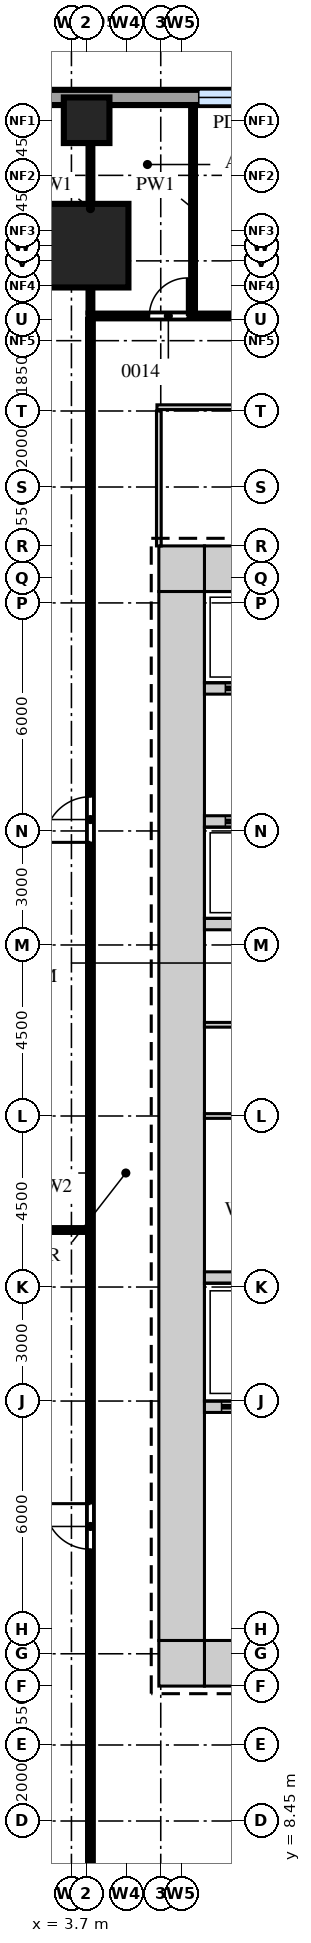
"""IFC4 building model, lengths in metres.
Left out: names, types, materials, properties, quantities, classifications, styles, units other than length and angle.
Written with IfcOpenShell. Run it as: python <this file> out.ifc"""

import sys

from ifc_helpers import new_model, si_unit, direction, frame, frame_2d, origin, origin_2d, place, context, subcontext, project, spatial, rectangle, extrude, source, transform, mapped, element, fill, save


model = new_model("IFC4")
c1 = context("Model", 3, precision=1e-05, world=origin(), true_north=direction((0.0, 1.0)))
c2 = subcontext(c1, "Body", "Model", "MODEL_VIEW")
j1 = project(units=[si_unit("LENGTHUNIT", "METRE"), si_unit("PLANEANGLEUNIT", "RADIAN")], contexts=[c1])
p1 = place(None, origin())
s1 = spatial("IfcSite", under=j1, at=p1, CompositionType="ELEMENT")
p2 = place(p1, origin())
s2 = spatial("IfcBuilding", under=s1, at=p2, CompositionType="ELEMENT")
p3 = place(p2, frame((0.0, 0.0, 18.5)))
s3 = spatial("IfcBuildingStorey", under=s2, at=p3, CompositionType="ELEMENT", Elevation=18.5)
m1 = source(origin(), c2, "Body", "SweptSolid", [
    extrude(rectangle(XDim=6.7, YDim=1.2, at=frame_2d((3.35, 0.0))), origin(), (0.0, 0.0, 1.0), 4.7),
])
p4 = place(p3, frame((7.2, 41.4, 0.0), z_axis=(0.0, 0.0, 1.0), x_axis=(1.0, 0.0, 0.0)))
e1 = element("IfcWall", 1, at=p4, inside=s3, PredefinedType="SHEAR", context=c2, shape_type="MappedRepresentation", body=[
    mapped(m1, transform((0.0, 0.0, 0.0))),
])
m2 = source(origin(), c2, "Body", "SweptSolid", [
    extrude(rectangle(XDim=1.2, YDim=1.2, at=frame_2d((0.6, 0.0))), origin(), (0.0, 0.0, 1.0), 4.7),
])
p5 = place(p3, frame((6.0, 41.4, 0.0), z_axis=(0.0, 0.0, 1.0), x_axis=(1.0, 0.0, 0.0)))
e2 = element("IfcWall", 2, at=p5, inside=s3, PredefinedType="SHEAR", context=c2, shape_type="MappedRepresentation", body=[
    mapped(m2, transform((0.0, 0.0, 0.0))),
])
p6 = place(p3, frame((7.2, 12.6, 0.0), z_axis=(0.0, 0.0, 1.0), x_axis=(1.0, 0.0, 0.0)))
e3 = element("IfcWall", 3, at=p6, inside=s3, PredefinedType="SHEAR", context=c2, shape_type="MappedRepresentation", body=[
    mapped(m1, transform((0.0, 0.0, 0.0))),
])
m3 = source(origin(), c2, "Body", "SweptSolid", [
    extrude(rectangle(XDim=1.2, YDim=2.1, at=frame_2d((0.6, 1.05))), frame((0.0, 0.61, 0.0), z_axis=(0.0, -1.0, 0.0), x_axis=(1.0, 0.0, 0.0)), (0.0, 0.0, 1.0), 1.22),
])
p7 = place(p6, frame((5.0, 0.0, 0.0)))
e4 = element("IfcOpeningElement", 4, at=p7, cuts=e3, PredefinedType="OPENING", context=c2, shape_type="MappedRepresentation", body=[
    mapped(m3, transform((0.0, 0.0, 0.0))),
])
p8 = place(p6, frame((1.65, 0.0, 0.0)))
e5 = element("IfcOpeningElement", 5, at=p8, cuts=e3, PredefinedType="OPENING", context=c2, shape_type="MappedRepresentation", body=[
    mapped(m3, transform((0.0, 0.0, 0.0))),
])
p9 = place(p3, frame((6.0, 12.6, 0.0), z_axis=(0.0, 0.0, 1.0), x_axis=(1.0, 0.0, 0.0)))
e6 = element("IfcWall", 6, at=p9, inside=s3, PredefinedType="SHEAR", context=c2, shape_type="MappedRepresentation", body=[
    mapped(m2, transform((0.0, 0.0, 0.0))),
])
m4 = source(origin(), c2, "Body", "SweptSolid", [
    extrude(rectangle(XDim=27.6, YDim=1.2, at=frame_2d((13.8, 0.0))), origin(), (0.0, 0.0, 1.0), 4.7),
])
p10 = place(p3, frame((6.6, 13.2, 0.0), z_axis=(0.0, 0.0, 1.0), x_axis=(0.0, 1.0, 0.0)))
e7 = element("IfcWall", 7, at=p10, inside=s3, PredefinedType="SHEAR", context=c2, shape_type="MappedRepresentation", body=[
    mapped(m4, transform((0.0, 0.0, 0.0))),
])
m5 = source(origin(), c2, "Body", "SweptSolid", [
    extrude(rectangle(XDim=13.0, YDim=0.3, at=frame_2d((6.5, 0.0))), origin(), (0.0, 0.0, 1.0), 4.7),
])
p11 = place(p3, frame((7.2, 22.75, 0.0), z_axis=(0.0, 0.0, 1.0), x_axis=(1.0, 0.0, 0.0)))
e8 = element("IfcWall", 8, at=p11, inside=s3, PredefinedType="STANDARD", context=c2, shape_type="MappedRepresentation", body=[
    mapped(m5, transform((0.0, 0.0, 0.0))),
])
m6 = source(origin(), c2, "Body", "SweptSolid", [
    extrude(rectangle(XDim=8.875, YDim=0.3, at=frame_2d((4.438, 0.0))), origin(), (0.0, 0.0, 1.0), 4.7),
])
p12 = place(p3, frame((7.2, 19.35, 0.0), z_axis=(0.0, 0.0, 1.0), x_axis=(1.0, 0.0, 0.0)))
e9 = element("IfcWall", 9, at=p12, inside=s3, PredefinedType="STANDARD", context=c2, shape_type="MappedRepresentation", body=[
    mapped(m6, transform((0.0, 0.0, 0.0))),
])
m7 = source(origin(), c2, "Body", "SweptSolid", [
    extrude(rectangle(XDim=1.2, YDim=2.1, at=frame_2d((0.6, 1.05))), frame((0.0, 0.16, 0.0), z_axis=(0.0, -1.0, 0.0), x_axis=(1.0, 0.0, 0.0)), (0.0, 0.0, 1.0), 0.32),
])
p13 = place(p12, frame((0.45, 0.0, 0.0)))
e10 = element("IfcOpeningElement", 10, at=p13, cuts=e9, PredefinedType="OPENING", context=c2, shape_type="MappedRepresentation", body=[
    mapped(m7, transform((0.0, 0.0, 0.0))),
])
p14 = place(p12, frame((2.8, 0.0, 0.0)))
e11 = element("IfcOpeningElement", 11, at=p14, cuts=e9, PredefinedType="OPENING", context=c2, shape_type="MappedRepresentation", body=[
    mapped(m7, transform((0.0, 0.0, 0.0))),
])
p15 = place(p12, frame((5.05, 0.0, 0.0)))
e12 = element("IfcOpeningElement", 12, at=p15, cuts=e9, PredefinedType="OPENING", context=c2, shape_type="MappedRepresentation", body=[
    mapped(m7, transform((0.0, 0.0, 0.0))),
])
p16 = place(p12, frame((7.2, 0.0, 0.0)))
e13 = element("IfcOpeningElement", 13, at=p16, cuts=e9, PredefinedType="OPENING", context=c2, shape_type="MappedRepresentation", body=[
    mapped(m7, transform((0.0, 0.0, 0.0))),
])
m8 = source(origin(), c2, "Body", "SweptSolid", [
    extrude(rectangle(XDim=15.6, YDim=0.3, at=frame_2d((7.8, 0.0))), origin(), (0.0, 0.0, 1.0), 4.7),
])
p17 = place(p3, frame((7.2, 32.05, 0.0), z_axis=(0.0, 0.0, 1.0), x_axis=(1.0, 0.0, 0.0)))
e14 = element("IfcWall", 14, at=p17, inside=s3, PredefinedType="STANDARD", context=c2, shape_type="MappedRepresentation", body=[
    mapped(m8, transform((0.0, 0.0, 0.0))),
])
p18 = place(p3, frame((7.2, 38.25, 0.0), z_axis=(0.0, 0.0, 1.0), x_axis=(1.0, 0.0, 0.0)))
e15 = element("IfcWall", 15, at=p18, inside=s3, PredefinedType="STANDARD", context=c2, shape_type="MappedRepresentation", body=[
    mapped(m8, transform((0.0, 0.0, 0.0))),
])
p19 = place(p18, frame((0.55, 0.0, 0.0)))
e16 = element("IfcOpeningElement", 16, at=p19, cuts=e15, PredefinedType="OPENING", context=c2, shape_type="MappedRepresentation", body=[
    mapped(m7, transform((0.0, 0.0, 0.0))),
])
p20 = place(p18, frame((3.1, 0.0, 0.0)))
e17 = element("IfcOpeningElement", 17, at=p20, cuts=e15, PredefinedType="OPENING", context=c2, shape_type="MappedRepresentation", body=[
    mapped(m7, transform((0.0, 0.0, 0.0))),
])
p21 = place(p18, frame((5.65, 0.0, 0.0)))
e18 = element("IfcOpeningElement", 18, at=p21, cuts=e15, PredefinedType="OPENING", context=c2, shape_type="MappedRepresentation", body=[
    mapped(m7, transform((0.0, 0.0, 0.0))),
])
p22 = place(p18, frame((8.2, 0.0, 0.0)))
e19 = element("IfcOpeningElement", 19, at=p22, cuts=e15, PredefinedType="OPENING", context=c2, shape_type="MappedRepresentation", body=[
    mapped(m7, transform((0.0, 0.0, 0.0))),
])
p23 = place(p3, frame((7.2, 34.75, 0.0), z_axis=(0.0, 0.0, 1.0), x_axis=(1.0, 0.0, 0.0)))
e20 = element("IfcWall", 20, at=p23, inside=s3, PredefinedType="STANDARD", context=c2, shape_type="MappedRepresentation", body=[
    mapped(m8, transform((0.0, 0.0, 0.0))),
])
p24 = place(p23, frame((0.55, 0.0, 0.0)))
e21 = element("IfcOpeningElement", 21, at=p24, cuts=e20, PredefinedType="OPENING", context=c2, shape_type="MappedRepresentation", body=[
    mapped(m7, transform((0.0, 0.0, 0.0))),
])
p25 = place(p23, frame((3.1, 0.0, 0.0)))
e22 = element("IfcOpeningElement", 22, at=p25, cuts=e20, PredefinedType="OPENING", context=c2, shape_type="MappedRepresentation", body=[
    mapped(m7, transform((0.0, 0.0, 0.0))),
])
p26 = place(p23, frame((5.65, 0.0, 0.0)))
e23 = element("IfcOpeningElement", 23, at=p26, cuts=e20, PredefinedType="OPENING", context=c2, shape_type="MappedRepresentation", body=[
    mapped(m7, transform((0.0, 0.0, 0.0))),
])
p27 = place(p23, frame((8.2, 0.0, 0.0)))
e24 = element("IfcOpeningElement", 24, at=p27, cuts=e20, PredefinedType="OPENING", context=c2, shape_type="MappedRepresentation", body=[
    mapped(m7, transform((0.0, 0.0, 0.0))),
])
m9 = source(origin(), c2, "Body", "SweptSolid", [
    extrude(rectangle(XDim=2.2, YDim=2.2, at=origin_2d()), origin(), (0.0, 0.0, 1.0), 4.7),
])
p28 = place(p3, frame((4.1, 49.9, 0.0), z_axis=(0.0, 0.0, 1.0), x_axis=(1.0, 0.0, 0.0)))
e25 = element("IfcColumn", 25, at=p28, inside=s3, PredefinedType="COLUMN", context=c2, shape_type="MappedRepresentation", body=[
    mapped(m9, transform((0.0, 0.0, 0.0))),
])
m10 = source(origin(), c2, "Body", "SweptSolid", [
    extrude(rectangle(XDim=1.2, YDim=1.2, at=origin_2d()), origin(), (0.0, 0.0, 1.0), 4.7),
])
p29 = place(p3, frame((4.1, 53.2, 0.0), z_axis=(0.0, 0.0, 1.0), x_axis=(1.0, 0.0, 0.0)))
e26 = element("IfcColumn", 26, at=p29, inside=s3, PredefinedType="COLUMN", context=c2, shape_type="MappedRepresentation", body=[
    mapped(m10, transform((0.0, 0.0, 0.0))),
])
m11 = source(origin(), c2, "Body", "SweptSolid", [
    extrude(rectangle(XDim=32.04, YDim=0.4, at=frame_2d((16.02, 0.0))), origin(), (0.0, 0.0, 1.0), 4.7),
])
p30 = place(p3, frame((30.25, 53.8, 0.0), z_axis=(0.0, 0.0, 1.0), x_axis=(-1.0, 0.0, 0.0)))
e27 = element("IfcWall", 27, at=p30, inside=s3, PredefinedType="SOLIDWALL", context=c2, shape_type="MappedRepresentation", body=[
    mapped(m11, transform((0.0, 0.0, 0.0))),
])
m12 = source(origin(), c2, "Body", "SweptSolid", [
    extrude(rectangle(XDim=2.4, YDim=2.4, at=frame_2d((1.2, 1.2))), frame((0.0, 0.21, 0.0), z_axis=(0.0, -1.0, 0.0), x_axis=(1.0, 0.0, 0.0)), (0.0, 0.0, 1.0), 0.42),
])
p31 = place(p30, frame((14.8, 0.0, 1.0)))
e28 = element("IfcOpeningElement", 28, at=p31, cuts=e27, PredefinedType="OPENING", context=c2, shape_type="MappedRepresentation", body=[
    mapped(m12, transform((0.0, 0.0, 0.0))),
])
p32 = place(p30, frame((20.8, 0.0, 1.0)))
e29 = element("IfcOpeningElement", 29, at=p32, cuts=e27, PredefinedType="OPENING", context=c2, shape_type="MappedRepresentation", body=[
    mapped(m12, transform((0.0, 0.0, 0.0))),
])
m13 = source(origin(), c2, "Body", "SweptSolid", [
    extrude(rectangle(XDim=41.8, YDim=0.125, at=frame_2d((20.9, 0.0))), origin(), (0.0, 0.0, 1.0), 4.7),
])
p33 = place(p3, frame((4.2, 6.15, 0.0), z_axis=(0.0, 0.0, 1.0), x_axis=(0.0, 1.0, 0.0)))
e30 = element("IfcWall", 30, at=p33, inside=s3, PredefinedType="PARTITIONING", context=c2, shape_type="MappedRepresentation", body=[
    mapped(m13, transform((0.0, 0.0, 0.0))),
])
m14 = source(origin(), c2, "Body", "SweptSolid", [
    extrude(rectangle(XDim=1.2, YDim=2.1, at=frame_2d((0.6, 1.05))), frame((0.0, 0.073, 0.0), z_axis=(0.0, -1.0, 0.0), x_axis=(1.0, 0.0, 0.0)), (0.0, 0.0, 1.0), 0.145),
])
p34 = place(p33, frame((9.45, 0.0, 0.0)))
e31 = element("IfcOpeningElement", 31, at=p34, cuts=e30, PredefinedType="OPENING", context=c2, shape_type="MappedRepresentation", body=[
    mapped(m14, transform((0.0, 0.0, 0.0))),
])
p35 = place(p33, frame((28.05, 0.0, 0.0)))
e32 = element("IfcOpeningElement", 32, at=p35, cuts=e30, PredefinedType="OPENING", context=c2, shape_type="MappedRepresentation", body=[
    mapped(m14, transform((0.0, 0.0, 0.0))),
])
m15 = source(origin(), c2, "Body", "SweptSolid", [
    extrude(rectangle(XDim=12.7, YDim=0.1, at=frame_2d((6.35, 0.0))), origin(), (0.0, 0.0, 1.0), 4.7),
])
p36 = place(p3, frame((-8.6, 24.0, 0.0), z_axis=(0.0, 0.0, 1.0), x_axis=(1.0, 0.0, 0.0)))
e33 = element("IfcWall", 33, at=p36, inside=s3, PredefinedType="PARTITIONING", context=c2, shape_type="MappedRepresentation", body=[
    mapped(m15, transform((0.0, 0.0, 0.0))),
])
m16 = source(origin(), c2, "Body", "SweptSolid", [
    extrude(rectangle(XDim=15.6, YDim=0.125, at=frame_2d((7.8, 0.0))), origin(), (0.0, 0.0, 1.0), 4.7),
])
p37 = place(p3, frame((7.2, 27.0, 0.0), z_axis=(0.0, 0.0, 1.0), x_axis=(1.0, 0.0, 0.0)))
e34 = element("IfcWall", 34, at=p37, inside=s3, PredefinedType="PARTITIONING", context=c2, shape_type="MappedRepresentation", body=[
    mapped(m16, transform((0.0, 0.0, 0.0))),
])
m17 = source(origin(), c2, "Body", "SweptSolid", [
    extrude(rectangle(XDim=0.9, YDim=2.1, at=frame_2d((0.45, 1.05))), frame((0.0, 0.073, 0.0), z_axis=(0.0, -1.0, 0.0), x_axis=(1.0, 0.0, 0.0)), (0.0, 0.0, 1.0), 0.145),
])
p38 = place(p37, frame((2.45, 0.0, 0.0)))
e35 = element("IfcOpeningElement", 35, at=p38, cuts=e34, PredefinedType="OPENING", context=c2, shape_type="MappedRepresentation", body=[
    mapped(m17, transform((0.0, 0.0, 0.0))),
])
p39 = place(p37, frame((8.25, 0.0, 0.0)))
e36 = element("IfcOpeningElement", 36, at=p39, cuts=e34, PredefinedType="OPENING", context=c2, shape_type="MappedRepresentation", body=[
    mapped(m17, transform((0.0, 0.0, 0.0))),
])
m18 = source(origin(), c2, "Body", "SweptSolid", [
    extrude(rectangle(XDim=1.0, YDim=2.1, at=frame_2d((0.5, 1.05))), frame((0.0, 0.073, 0.0), z_axis=(0.0, -1.0, 0.0), x_axis=(1.0, 0.0, 0.0)), (0.0, 0.0, 1.0), 0.145),
])
p40 = place(p37, frame((13.1, 0.0, 0.0)))
e37 = element("IfcOpeningElement", 37, at=p40, cuts=e34, PredefinedType="OPENING", context=c2, shape_type="MappedRepresentation", body=[
    mapped(m18, transform((0.0, 0.0, 0.0))),
])
m19 = source(origin(), c2, "Body", "SweptSolid", [
    extrude(rectangle(XDim=3.95, YDim=0.125, at=frame_2d((1.975, 0.0))), origin(), (0.0, 0.0, 1.0), 4.7),
])
p41 = place(p3, frame((7.2, 29.4, 0.0), z_axis=(0.0, 0.0, 1.0), x_axis=(1.0, 0.0, 0.0)))
e38 = element("IfcWall", 38, at=p41, inside=s3, PredefinedType="PARTITIONING", context=c2, shape_type="MappedRepresentation", body=[
    mapped(m19, transform((0.0, 0.0, 0.0))),
])
p42 = place(p41, frame((1.55, 0.0, 0.0)))
e39 = element("IfcOpeningElement", 39, at=p42, cuts=e38, PredefinedType="OPENING", context=c2, shape_type="MappedRepresentation", body=[
    mapped(m17, transform((0.0, 0.0, 0.0))),
])
m20 = source(origin(), c2, "Body", "SweptSolid", [
    extrude(rectangle(XDim=3.55, YDim=0.125, at=frame_2d((1.775, 0.0))), origin(), (0.0, 0.0, 1.0), 4.7),
])
p43 = place(p3, frame((6.0, 42.0, 0.0), z_axis=(0.0, 0.0, 1.0), x_axis=(0.0, 1.0, 0.0)))
e40 = element("IfcWall", 40, at=p43, inside=s3, PredefinedType="PARTITIONING", context=c2, shape_type="MappedRepresentation", body=[
    mapped(m20, transform((0.0, 0.0, 0.0))),
])
m21 = source(origin(), c2, "Body", "SweptSolid", [
    extrude(rectangle(XDim=7.95, YDim=0.125, at=frame_2d((3.975, 0.0))), origin(), (0.0, 0.0, 1.0), 4.7),
])
p44 = place(p3, frame((5.95, 45.65, 0.0), z_axis=(0.0, 0.0, 1.0), x_axis=(1.0, 0.0, 0.0)))
e41 = element("IfcWall", 41, at=p44, inside=s3, PredefinedType="PARTITIONING", context=c2, shape_type="MappedRepresentation", body=[
    mapped(m21, transform((0.0, 0.0, 0.0))),
])
p45 = place(p44, frame((3.55, 0.0, 0.0)))
e42 = element("IfcOpeningElement", 42, at=p45, cuts=e41, PredefinedType="OPENING", context=c2, shape_type="MappedRepresentation", body=[
    mapped(m17, transform((0.0, 0.0, 0.0))),
])
m22 = source(origin(), c2, "Body", "SweptSolid", [
    extrude(rectangle(XDim=26.1, YDim=0.125, at=frame_2d((13.05, 0.0))), origin(), (0.0, 0.0, 1.0), 4.7),
])
p46 = place(p3, frame((4.15, 48.05, 0.0), z_axis=(0.0, 0.0, 1.0), x_axis=(1.0, 0.0, 0.0)))
e43 = element("IfcWall", 43, at=p46, inside=s3, PredefinedType="PARTITIONING", context=c2, shape_type="MappedRepresentation", body=[
    mapped(m22, transform((0.0, 0.0, 0.0))),
])
p47 = place(p46, frame((1.6, 0.0, 0.0)))
e44 = element("IfcOpeningElement", 44, at=p47, cuts=e43, PredefinedType="OPENING", context=c2, shape_type="MappedRepresentation", body=[
    mapped(m18, transform((0.0, 0.0, 0.0))),
])
p48 = place(p46, frame((6.7, 0.0, 0.0)))
e45 = element("IfcOpeningElement", 45, at=p48, cuts=e43, PredefinedType="OPENING", context=c2, shape_type="MappedRepresentation", body=[
    mapped(m17, transform((0.0, 0.0, 0.0))),
])
p49 = place(p46, frame((18.6, 0.0, 0.0)))
e46 = element("IfcOpeningElement", 46, at=p49, cuts=e43, PredefinedType="OPENING", context=c2, shape_type="MappedRepresentation", body=[
    mapped(m17, transform((0.0, 0.0, 0.0))),
])
m23 = source(origin(), c2, "Body", "SweptSolid", [
    extrude(rectangle(XDim=5.45, YDim=0.1, at=frame_2d((2.725, 0.0))), origin(), (0.0, 0.0, 1.0), 4.7),
])
for number, where, z_axis, x_axis in (
    (47, (4.2, 48.15, 0.0), (0.0, 0.0, 1.0), (0.0, 1.0, 0.0)),
    (48, (6.9, 48.15, 0.0), (0.0, 0.0, 1.0), (0.0, 1.0, 0.0)),
):
    element("IfcWall", number, at=place(p3, frame(where, z_axis=z_axis, x_axis=x_axis)), inside=s3, PredefinedType="PARTITIONING", context=c2, shape_type="MappedRepresentation", body=[
        mapped(m23, transform((0.0, 0.0, 0.0))),
    ])
m24 = source(origin(), c2, "Body", "SweptSolid", [
    extrude(rectangle(XDim=2.4, YDim=2.4, at=frame_2d((1.2, 1.2))), frame((0.0, 0.03, 0.0), z_axis=(0.0, -1.0, 0.0), x_axis=(1.0, 0.0, 0.0)), (0.0, 0.0, 1.0), 0.06),
])
p50 = place(p32, origin())
e49 = element("IfcWindow", 49, at=p50, inside=s3, PartitioningType="SINGLE_PANEL", PredefinedType="WINDOW", context=c2, shape_type="MappedRepresentation", body=[
    mapped(m24, transform((0.0, 0.0, 0.0))),
])
fill(e29, e49)
m25 = source(origin(), c2, "Body", "SweptSolid", [
    extrude(rectangle(XDim=1.0, YDim=2.1, at=frame_2d((0.5, 1.05))), frame((0.0, 0.025, 0.0), z_axis=(0.0, -1.0, 0.0), x_axis=(1.0, 0.0, 0.0)), (0.0, 0.0, 1.0), 0.05),
])
p51 = place(p47, origin())
e50 = element("IfcDoor", 50, at=p51, inside=s3, OperationType="SINGLE_SWING_LEFT", PredefinedType="DOOR", context=c2, shape_type="MappedRepresentation", body=[
    mapped(m25, transform((0.0, 0.0, 0.0))),
])
fill(e44, e50)
m26 = source(origin(), c2, "Body", "SweptSolid", [
    extrude(rectangle(XDim=1.2, YDim=2.1, at=frame_2d((0.6, 1.05))), frame((0.0, 0.025, 0.0), z_axis=(0.0, -1.0, 0.0), x_axis=(1.0, 0.0, 0.0)), (0.0, 0.0, 1.0), 0.05),
])
p52 = place(p34, origin())
e51 = element("IfcDoor", 51, at=p52, inside=s3, OperationType="SINGLE_SWING_LEFT", PredefinedType="DOOR", context=c2, shape_type="MappedRepresentation", body=[
    mapped(m26, transform((0.0, 0.0, 0.0))),
])
fill(e31, e51)
p53 = place(p35, origin())
e52 = element("IfcDoor", 52, at=p53, inside=s3, OperationType="SINGLE_SWING_RIGHT", PredefinedType="DOOR", context=c2, shape_type="MappedRepresentation", body=[
    mapped(m26, transform((0.0, 0.0, 0.0))),
])
fill(e32, e52)
p54 = place(p24, origin())
e53 = element("IfcDoor", 53, at=p54, inside=s3, OperationType="DOUBLE_DOOR_SLIDING", PredefinedType="DOOR", context=c2, shape_type="MappedRepresentation", body=[
    mapped(m26, transform((0.0, 0.0, 0.0))),
])
fill(e21, e53)
p55 = place(p19, origin())
e54 = element("IfcDoor", 54, at=p55, inside=s3, OperationType="DOUBLE_DOOR_SLIDING", PredefinedType="DOOR", context=c2, shape_type="MappedRepresentation", body=[
    mapped(m26, transform((0.0, 0.0, 0.0))),
])
fill(e16, e54)
p56 = place(p13, origin())
e55 = element("IfcDoor", 55, at=p56, inside=s3, OperationType="DOUBLE_DOOR_SLIDING", PredefinedType="DOOR", context=c2, shape_type="MappedRepresentation", body=[
    mapped(m26, transform((0.0, 0.0, 0.0))),
])
fill(e10, e55)
save(model, sys.argv[1])
